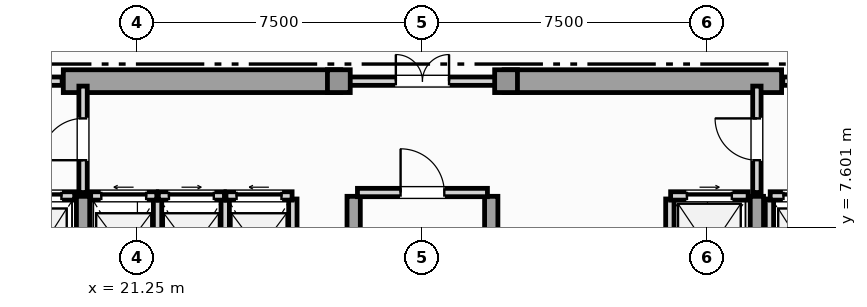
"""IFC4 building model, lengths in metres.
Left out: names, types, materials, properties, quantities, classifications, styles, units other than length and angle.
Written with IfcOpenShell. Run it as: python <this file> out.ifc"""

import sys

from ifc_helpers import new_model, si_unit, direction, frame, frame_2d, origin, origin_2d, place, context, subcontext, project, spatial, rectangle, extrude, element, fill, save


model = new_model("IFC4")
c1 = context("Model", 3, precision=1e-05, world=origin(), true_north=direction((0.0, 1.0)))
c2 = subcontext(c1, "Body", "Model", "MODEL_VIEW")
j1 = project(units=[si_unit("LENGTHUNIT", "METRE"), si_unit("PLANEANGLEUNIT", "RADIAN")], contexts=[c1])
p1 = place(None, origin())
s1 = spatial("IfcSite", under=j1, at=p1, CompositionType="ELEMENT")
p2 = place(p1, origin())
s2 = spatial("IfcBuilding", under=s1, at=p2, CompositionType="ELEMENT")
p3 = place(p2, frame((0.0, 0.0, 251.7)))
s3 = spatial("IfcBuildingStorey", under=s2, at=p3, CompositionType="ELEMENT", Elevation=251.7)
for number, where, z_axis, x_axis in (
    (1, (19.3, 11.45, 0.0), (0.0, 0.0, 1.0), (1.0, 0.0, 0.0)),
    (2, (30.9, 11.45, 0.0), (0.0, 0.0, 1.0), (1.0, 0.0, 0.0)),
):
    element("IfcWall", number, at=place(p3, frame(where, z_axis=z_axis, x_axis=x_axis)), inside=s3, PredefinedType="SHEAR", context=c2, shape_type="SweptSolid", body=[
        extrude(rectangle(XDim=7.3, YDim=0.6, at=frame_2d((3.65, 0.0))), origin(), (0.0, 0.0, 1.0), 4.85),
    ])
for number, where, z_axis, x_axis in (
    (3, (19.82, 0.92, 0.0), (0.0, 0.0, 1.0), (0.0, 1.0, 0.0)),
    (4, (26.94, 0.92, 0.0), (0.0, 0.0, 1.0), (0.0, 1.0, 0.0)),
    (5, (30.56, 0.92, 0.0), (0.0, 0.0, 1.0), (0.0, 1.0, 0.0)),
    (6, (37.55, 0.92, 0.0), (0.0, 0.0, 1.0), (0.0, 1.0, 0.0)),
):
    element("IfcWall", number, at=place(p3, frame(where, z_axis=z_axis, x_axis=x_axis)), inside=s3, PredefinedType="SHEAR", context=c2, shape_type="SweptSolid", body=[
        extrude(rectangle(XDim=7.5, YDim=0.35, at=frame_2d((3.75, 0.0))), origin(), (0.0, 0.0, 1.0), 4.85),
    ])
for number, where, z_axis, x_axis in (
    (7, (26.55, 11.45, 0.0), (0.0, 0.0, 1.0), (1.0, 0.0, 0.0)),
    (8, (30.95, 11.45, 0.0), (0.0, 0.0, 1.0), (1.0, 0.0, 0.0)),
):
    element("IfcColumn", number, at=place(p3, frame(where, z_axis=z_axis, x_axis=x_axis)), inside=s3, PredefinedType="COLUMN", context=c2, shape_type="SweptSolid", body=[
        extrude(rectangle(XDim=0.6, YDim=0.6, at=origin_2d()), origin(), (0.0, 0.0, 1.0), 5.05),
    ])
p4 = place(p3, frame((17.78, 8.43, 0.0), z_axis=(0.0, 0.0, 1.0), x_axis=(1.0, 0.0, 0.0)))
e9 = element("IfcWall", 9, at=p4, inside=s3, PredefinedType="SOLIDWALL", context=c2, shape_type="SweptSolid", body=[
    extrude(rectangle(XDim=1.82, YDim=0.22, at=frame_2d((0.91, 0.0))), origin(), (0.0, 0.0, 1.0), 4.85),
])
p5 = place(p4, frame((0.35, 0.0, 0.0)))
e10 = element("IfcOpeningElement", 10, at=p5, cuts=e9, PredefinedType="OPENING", context=c2, shape_type="SweptSolid", body=[
    extrude(rectangle(XDim=1.12, YDim=2.25, at=frame_2d((0.56, 1.125))), frame((0.0, 0.12, 0.0), z_axis=(0.0, -1.0, 0.0), x_axis=(1.0, 0.0, 0.0)), (0.0, 0.0, 1.0), 0.24),
])
p6 = place(p3, frame((37.88, 5.65, 0.0), z_axis=(0.0, 0.0, 1.0), x_axis=(0.0, 1.0, 0.0)))
e11 = element("IfcWall", 11, at=p6, inside=s3, PredefinedType="SOLIDWALL", context=c2, shape_type="SweptSolid", body=[
    extrude(rectangle(XDim=2.7, YDim=0.22, at=frame_2d((1.35, 0.0))), origin(), (0.0, 0.0, 1.0), 4.85),
])
p7 = place(p3, frame((37.9, 8.43, 0.0), z_axis=(0.0, 0.0, 1.0), x_axis=(1.0, 0.0, 0.0)))
e12 = element("IfcWall", 12, at=p7, inside=s3, PredefinedType="SOLIDWALL", context=c2, shape_type="SweptSolid", body=[
    extrude(rectangle(XDim=1.82, YDim=0.22, at=frame_2d((0.91, 0.0))), origin(), (0.0, 0.0, 1.0), 4.85),
])
p8 = place(p7, frame((0.35, 0.0, 0.0)))
e13 = element("IfcOpeningElement", 13, at=p8, cuts=e12, PredefinedType="OPENING", context=c2, shape_type="SweptSolid", body=[
    extrude(rectangle(XDim=1.12, YDim=2.25, at=frame_2d((0.56, 1.125))), frame((0.0, 0.12, 0.0), z_axis=(0.0, -1.0, 0.0), x_axis=(1.0, 0.0, 0.0)), (0.0, 0.0, 1.0), 0.24),
])
p9 = place(p3, frame((35.26, 5.65, 0.0), z_axis=(0.0, 0.0, 1.0), x_axis=(0.0, 1.0, 0.0)))
e14 = element("IfcWall", 14, at=p9, inside=s3, PredefinedType="SOLIDWALL", context=c2, shape_type="SweptSolid", body=[
    extrude(rectangle(XDim=2.7, YDim=0.22, at=frame_2d((1.35, 0.0))), origin(), (0.0, 0.0, 1.0), 4.85),
])
p10 = place(p3, frame((35.28, 8.43, 0.0), z_axis=(0.0, 0.0, 1.0), x_axis=(1.0, 0.0, 0.0)))
e15 = element("IfcWall", 15, at=p10, inside=s3, PredefinedType="SOLIDWALL", context=c2, shape_type="SweptSolid", body=[
    extrude(rectangle(XDim=2.04, YDim=0.22, at=frame_2d((1.02, 0.0))), origin(), (0.0, 0.0, 1.0), 4.85),
])
p11 = place(p10, frame((0.43, 0.0, 0.0)))
e16 = element("IfcOpeningElement", 16, at=p11, cuts=e15, PredefinedType="OPENING", context=c2, shape_type="SweptSolid", body=[
    extrude(rectangle(XDim=1.18, YDim=2.2, at=frame_2d((0.59, 1.1))), frame((0.0, 0.12, 0.0), z_axis=(0.0, -1.0, 0.0), x_axis=(1.0, 0.0, 0.0)), (0.0, 0.0, 1.0), 0.24),
])
p12 = place(p3, frame((21.78, 5.65, 0.0), z_axis=(0.0, 0.0, 1.0), x_axis=(0.0, 1.0, 0.0)))
e17 = element("IfcWall", 17, at=p12, inside=s3, PredefinedType="SOLIDWALL", context=c2, shape_type="SweptSolid", body=[
    extrude(rectangle(XDim=2.7, YDim=0.22, at=frame_2d((1.35, 0.0))), origin(), (0.0, 0.0, 1.0), 4.85),
])
p13 = place(p3, frame((20.02, 8.43, 0.0), z_axis=(0.0, 0.0, 1.0), x_axis=(1.0, 0.0, 0.0)))
e18 = element("IfcWall", 18, at=p13, inside=s3, PredefinedType="SOLIDWALL", context=c2, shape_type="SweptSolid", body=[
    extrude(rectangle(XDim=1.74, YDim=0.22, at=frame_2d((0.87, 0.0))), origin(), (0.0, 0.0, 1.0), 4.85),
])
p14 = place(p13, frame((0.28, 0.0, 0.0)))
e19 = element("IfcOpeningElement", 19, at=p14, cuts=e18, PredefinedType="OPENING", context=c2, shape_type="SweptSolid", body=[
    extrude(rectangle(XDim=1.18, YDim=2.2, at=frame_2d((0.59, 1.1))), frame((0.0, 0.12, 0.0), z_axis=(0.0, -1.0, 0.0), x_axis=(1.0, 0.0, 0.0)), (0.0, 0.0, 1.0), 0.24),
])
p15 = place(p3, frame((23.56, 5.65, 0.0), z_axis=(0.0, 0.0, 1.0), x_axis=(0.0, 1.0, 0.0)))
e20 = element("IfcWall", 20, at=p15, inside=s3, PredefinedType="SOLIDWALL", context=c2, shape_type="SweptSolid", body=[
    extrude(rectangle(XDim=2.7, YDim=0.22, at=frame_2d((1.35, 0.0))), origin(), (0.0, 0.0, 1.0), 4.85),
])
p16 = place(p3, frame((21.8, 8.43, 0.0), z_axis=(0.0, 0.0, 1.0), x_axis=(1.0, 0.0, 0.0)))
e21 = element("IfcWall", 21, at=p16, inside=s3, PredefinedType="SOLIDWALL", context=c2, shape_type="SweptSolid", body=[
    extrude(rectangle(XDim=1.74, YDim=0.22, at=frame_2d((0.87, 0.0))), origin(), (0.0, 0.0, 1.0), 4.85),
])
p17 = place(p16, frame((0.28, 0.0, 0.0)))
e22 = element("IfcOpeningElement", 22, at=p17, cuts=e21, PredefinedType="OPENING", context=c2, shape_type="SweptSolid", body=[
    extrude(rectangle(XDim=1.18, YDim=2.2, at=frame_2d((0.59, 1.1))), frame((0.0, 0.12, 0.0), z_axis=(0.0, -1.0, 0.0), x_axis=(1.0, 0.0, 0.0)), (0.0, 0.0, 1.0), 0.24),
])
p18 = place(p3, frame((25.34, 5.65, 0.0), z_axis=(0.0, 0.0, 1.0), x_axis=(0.0, 1.0, 0.0)))
e23 = element("IfcWall", 23, at=p18, inside=s3, PredefinedType="SOLIDWALL", context=c2, shape_type="SweptSolid", body=[
    extrude(rectangle(XDim=2.7, YDim=0.22, at=frame_2d((1.35, 0.0))), origin(), (0.0, 0.0, 1.0), 4.85),
])
p19 = place(p3, frame((23.58, 8.43, 0.0), z_axis=(0.0, 0.0, 1.0), x_axis=(1.0, 0.0, 0.0)))
e24 = element("IfcWall", 24, at=p19, inside=s3, PredefinedType="SOLIDWALL", context=c2, shape_type="SweptSolid", body=[
    extrude(rectangle(XDim=1.74, YDim=0.22, at=frame_2d((0.87, 0.0))), origin(), (0.0, 0.0, 1.0), 4.85),
])
p20 = place(p19, frame((0.28, 0.0, 0.0)))
e25 = element("IfcOpeningElement", 25, at=p20, cuts=e24, PredefinedType="OPENING", context=c2, shape_type="SweptSolid", body=[
    extrude(rectangle(XDim=1.18, YDim=2.2, at=frame_2d((0.59, 1.1))), frame((0.0, 0.12, 0.0), z_axis=(0.0, -1.0, 0.0), x_axis=(1.0, 0.0, 0.0)), (0.0, 0.0, 1.0), 0.24),
])
p21 = place(p3, frame((27.04, 8.52, 0.0), z_axis=(0.0, 0.0, 1.0), x_axis=(1.0, 0.0, 0.0)))
e26 = element("IfcWall", 26, at=p21, inside=s3, PredefinedType="SOLIDWALL", context=c2, shape_type="SweptSolid", body=[
    extrude(rectangle(XDim=3.42, YDim=0.22, at=frame_2d((1.71, 0.0))), origin(), (0.0, 0.0, 1.0), 4.85),
])
p22 = place(p21, frame((1.135, 0.0, 0.0)))
e27 = element("IfcOpeningElement", 27, at=p22, cuts=e26, PredefinedType="OPENING", context=c2, shape_type="SweptSolid", body=[
    extrude(rectangle(XDim=1.15, YDim=2.2, at=frame_2d((0.575, 1.1))), frame((0.0, 0.12, 0.0), z_axis=(0.0, -1.0, 0.0), x_axis=(1.0, 0.0, 0.0)), (0.0, 0.0, 1.0), 0.24),
])
p23 = place(p3, frame((19.82, 8.52, 0.0), z_axis=(0.0, 0.0, 1.0), x_axis=(0.0, 1.0, 0.0)))
e28 = element("IfcWall", 28, at=p23, inside=s3, PredefinedType="SOLIDWALL", context=c2, shape_type="SweptSolid", body=[
    extrude(rectangle(XDim=2.8, YDim=0.22, at=frame_2d((1.4, 0.0))), origin(), (0.0, 0.0, 1.0), 4.306),
])
p24 = place(p23, frame((0.85, 0.0, 0.0)))
e29 = element("IfcOpeningElement", 29, at=p24, cuts=e28, PredefinedType="OPENING", context=c2, shape_type="SweptSolid", body=[
    extrude(rectangle(XDim=1.1, YDim=2.2, at=frame_2d((0.55, 1.1))), frame((0.0, 0.12, 0.0), z_axis=(0.0, -1.0, 0.0), x_axis=(1.0, 0.0, 0.0)), (0.0, 0.0, 1.0), 0.24),
])
p25 = place(p3, frame((37.55, 8.52, 0.0), z_axis=(0.0, 0.0, 1.0), x_axis=(0.0, 1.0, 0.0)))
e30 = element("IfcWall", 30, at=p25, inside=s3, PredefinedType="SOLIDWALL", context=c2, shape_type="SweptSolid", body=[
    extrude(rectangle(XDim=2.8, YDim=0.22, at=frame_2d((1.4, 0.0))), origin(), (0.0, 0.0, 1.0), 4.306),
])
p26 = place(p25, frame((0.85, 0.0, 0.0)))
e31 = element("IfcOpeningElement", 31, at=p26, cuts=e30, PredefinedType="OPENING", context=c2, shape_type="SweptSolid", body=[
    extrude(rectangle(XDim=1.1, YDim=2.2, at=frame_2d((0.55, 1.1))), frame((0.0, 0.12, 0.0), z_axis=(0.0, -1.0, 0.0), x_axis=(1.0, 0.0, 0.0)), (0.0, 0.0, 1.0), 0.24),
])
p27 = place(p3, frame((16.23, 11.45, 0.0), z_axis=(0.0, 0.0, 1.0), x_axis=(1.0, 0.0, 0.0)))
e32 = element("IfcWall", 32, at=p27, inside=s3, PredefinedType="SOLIDWALL", context=c2, shape_type="SweptSolid", body=[
    extrude(rectangle(XDim=3.04, YDim=0.22, at=frame_2d((1.52, 0.0))), origin(), (0.0, 0.0, 1.0), 4.85),
])
p28 = place(p27, frame((0.97, 0.0, 0.0)))
e33 = element("IfcOpeningElement", 33, at=p28, cuts=e32, PredefinedType="OPENING", context=c2, shape_type="SweptSolid", body=[
    extrude(rectangle(XDim=1.1, YDim=2.2, at=frame_2d((0.55, 1.1))), frame((0.0, 0.12, 0.0), z_axis=(0.0, -1.0, 0.0), x_axis=(1.0, 0.0, 0.0)), (0.0, 0.0, 1.0), 0.24),
])
p29 = place(p3, frame((26.63, 11.45, 0.0), z_axis=(0.0, 0.0, 1.0), x_axis=(1.0, 0.0, 0.0)))
e34 = element("IfcWall", 34, at=p29, inside=s3, PredefinedType="SOLIDWALL", context=c2, shape_type="SweptSolid", body=[
    extrude(rectangle(XDim=4.24, YDim=0.22, at=frame_2d((2.12, 0.0))), origin(), (0.0, 0.0, 1.0), 4.85),
])
p30 = place(p29, frame((1.42, 0.0, 0.0)))
e35 = element("IfcOpeningElement", 35, at=p30, cuts=e34, PredefinedType="OPENING", context=c2, shape_type="SweptSolid", body=[
    extrude(rectangle(XDim=1.4, YDim=2.2, at=frame_2d((0.7, 1.1))), frame((0.0, 0.12, 0.0), z_axis=(0.0, -1.0, 0.0), x_axis=(1.0, 0.0, 0.0)), (0.0, 0.0, 1.0), 0.24),
])
p31 = place(p3, frame((38.23, 11.45, 0.0), z_axis=(0.0, 0.0, 1.0), x_axis=(1.0, 0.0, 0.0)))
e36 = element("IfcWall", 36, at=p31, inside=s3, PredefinedType="SOLIDWALL", context=c2, shape_type="SweptSolid", body=[
    extrude(rectangle(XDim=3.04, YDim=0.22, at=frame_2d((1.52, 0.0))), origin(), (0.0, 0.0, 1.0), 4.85),
])
p32 = place(p31, frame((0.97, 0.0, 0.0)))
e37 = element("IfcOpeningElement", 37, at=p32, cuts=e36, PredefinedType="OPENING", context=c2, shape_type="SweptSolid", body=[
    extrude(rectangle(XDim=1.1, YDim=2.2, at=frame_2d((0.55, 1.1))), frame((0.0, 0.12, 0.0), z_axis=(0.0, -1.0, 0.0), x_axis=(1.0, 0.0, 0.0)), (0.0, 0.0, 1.0), 0.24),
])
p33 = place(p5, origin())
e38 = element("IfcDoor", 38, at=p33, inside=s3, OperationType="SLIDING_TO_RIGHT", PredefinedType="DOOR", context=c2, shape_type="SweptSolid", body=[
    extrude(rectangle(XDim=1.12, YDim=2.25, at=frame_2d((0.56, 1.125))), frame((0.0, 0.025, 0.0), z_axis=(0.0, -1.0, 0.0), x_axis=(1.0, 0.0, 0.0)), (0.0, 0.0, 1.0), 0.05),
])
fill(e10, e38)
p34 = place(p8, origin())
e39 = element("IfcDoor", 39, at=p34, inside=s3, OperationType="SLIDING_TO_LEFT", PredefinedType="DOOR", context=c2, shape_type="SweptSolid", body=[
    extrude(rectangle(XDim=1.12, YDim=2.25, at=frame_2d((0.56, 1.125))), frame((0.0, 0.025, 0.0), z_axis=(0.0, -1.0, 0.0), x_axis=(1.0, 0.0, 0.0)), (0.0, 0.0, 1.0), 0.05),
])
fill(e13, e39)
p35 = place(p11, origin())
e40 = element("IfcDoor", 40, at=p35, inside=s3, OperationType="SLIDING_TO_RIGHT", PredefinedType="DOOR", context=c2, shape_type="SweptSolid", body=[
    extrude(rectangle(XDim=1.18, YDim=2.2, at=frame_2d((0.59, 1.1))), frame((0.0, 0.025, 0.0), z_axis=(0.0, -1.0, 0.0), x_axis=(1.0, 0.0, 0.0)), (0.0, 0.0, 1.0), 0.05),
])
fill(e16, e40)
p36 = place(p14, origin())
e41 = element("IfcDoor", 41, at=p36, inside=s3, OperationType="SLIDING_TO_LEFT", PredefinedType="DOOR", context=c2, shape_type="SweptSolid", body=[
    extrude(rectangle(XDim=1.18, YDim=2.2, at=frame_2d((0.59, 1.1))), frame((0.0, 0.025, 0.0), z_axis=(0.0, -1.0, 0.0), x_axis=(1.0, 0.0, 0.0)), (0.0, 0.0, 1.0), 0.05),
])
fill(e19, e41)
p37 = place(p17, origin())
e42 = element("IfcDoor", 42, at=p37, inside=s3, OperationType="SLIDING_TO_RIGHT", PredefinedType="DOOR", context=c2, shape_type="SweptSolid", body=[
    extrude(rectangle(XDim=1.18, YDim=2.2, at=frame_2d((0.59, 1.1))), frame((0.0, 0.025, 0.0), z_axis=(0.0, -1.0, 0.0), x_axis=(1.0, 0.0, 0.0)), (0.0, 0.0, 1.0), 0.05),
])
fill(e22, e42)
p38 = place(p20, origin())
e43 = element("IfcDoor", 43, at=p38, inside=s3, OperationType="SLIDING_TO_LEFT", PredefinedType="DOOR", context=c2, shape_type="SweptSolid", body=[
    extrude(rectangle(XDim=1.18, YDim=2.2, at=frame_2d((0.59, 1.1))), frame((0.0, 0.025, 0.0), z_axis=(0.0, -1.0, 0.0), x_axis=(1.0, 0.0, 0.0)), (0.0, 0.0, 1.0), 0.05),
])
fill(e25, e43)
p39 = place(p22, origin())
e44 = element("IfcDoor", 44, at=p39, inside=s3, OperationType="SINGLE_SWING_LEFT", PredefinedType="DOOR", context=c2, shape_type="SweptSolid", body=[
    extrude(rectangle(XDim=1.15, YDim=2.2, at=frame_2d((0.575, 1.1))), frame((0.0, 0.025, 0.0), z_axis=(0.0, -1.0, 0.0), x_axis=(1.0, 0.0, 0.0)), (0.0, 0.0, 1.0), 0.05),
])
fill(e27, e44)
p40 = place(p24, origin())
e45 = element("IfcDoor", 45, at=p40, inside=s3, OperationType="SINGLE_SWING_LEFT", PredefinedType="DOOR", context=c2, shape_type="SweptSolid", body=[
    extrude(rectangle(XDim=1.1, YDim=2.2, at=frame_2d((0.55, 1.1))), frame((0.0, 0.025, 0.0), z_axis=(0.0, -1.0, 0.0), x_axis=(1.0, 0.0, 0.0)), (0.0, 0.0, 1.0), 0.05),
])
fill(e29, e45)
p41 = place(p26, origin())
e46 = element("IfcDoor", 46, at=p41, inside=s3, OperationType="SINGLE_SWING_RIGHT", PredefinedType="DOOR", context=c2, shape_type="SweptSolid", body=[
    extrude(rectangle(XDim=1.1, YDim=2.2, at=frame_2d((0.55, 1.1))), frame((0.0, 0.025, 0.0), z_axis=(0.0, -1.0, 0.0), x_axis=(1.0, 0.0, 0.0)), (0.0, 0.0, 1.0), 0.05),
])
fill(e31, e46)
p42 = place(p30, origin())
e47 = element("IfcDoor", 47, at=p42, inside=s3, OperationType="DOUBLE_DOOR_SINGLE_SWING", PredefinedType="DOOR", context=c2, shape_type="SweptSolid", body=[
    extrude(rectangle(XDim=1.4, YDim=2.2, at=frame_2d((0.7, 1.1))), frame((0.0, 0.025, 0.0), z_axis=(0.0, -1.0, 0.0), x_axis=(1.0, 0.0, 0.0)), (0.0, 0.0, 1.0), 0.05),
])
fill(e35, e47)
save(model, sys.argv[1])
